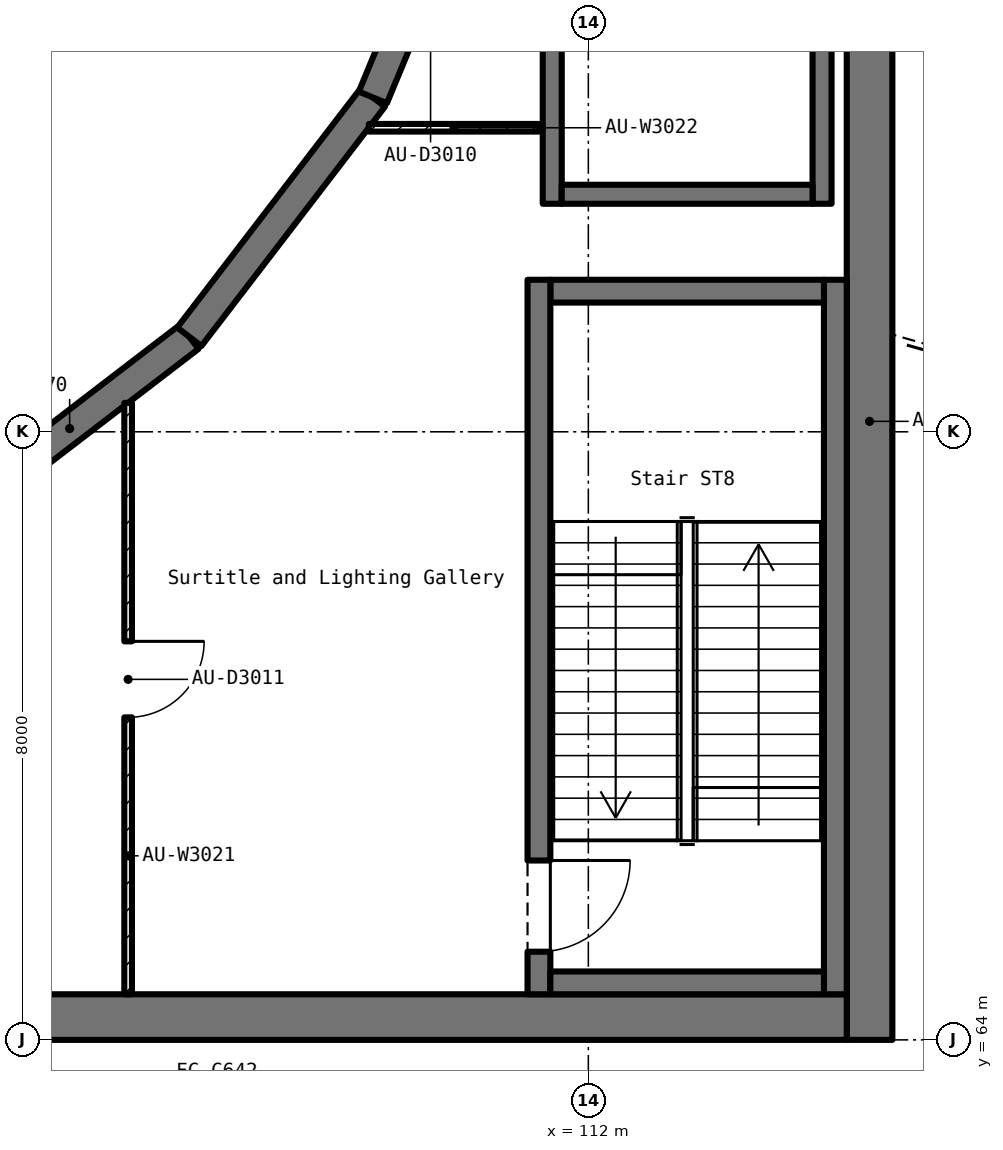
"""IFC4 building model, lengths in metres.
Left out: names, types, materials, properties, quantities, classifications, styles, units other than length and angle.
Written with IfcOpenShell. Run it as: python <this file> out.ifc"""

import sys

from ifc_helpers import new_model, si_unit, direction, frame, frame_2d, origin, place, context, subcontext, project, spatial, rectangle, extrude, element, fill, save


model = new_model("IFC4")
c1 = context("Model", 3, precision=1e-05, world=origin(), true_north=direction((0.0, 1.0)))
c2 = subcontext(c1, "Body", "Model", "MODEL_VIEW")
j1 = project(units=[si_unit("LENGTHUNIT", "METRE"), si_unit("PLANEANGLEUNIT", "RADIAN")], contexts=[c1])
p1 = place(None, origin())
s1 = spatial("IfcSite", under=j1, at=p1, CompositionType="ELEMENT")
p2 = place(p1, origin())
s2 = spatial("IfcBuilding", under=s1, at=p2, CompositionType="ELEMENT")
p3 = place(p2, frame((0.0, 0.0, 11.5)))
s3 = spatial("IfcBuildingStorey", under=s2, at=p3, CompositionType="ELEMENT", Elevation=11.5)
p4 = place(p3, frame((115.7, 64.0, 0.0), z_axis=(0.0, 0.0, 1.0), x_axis=(0.0, 1.0, 0.0)))
e1 = element("IfcWall", 1, at=p4, inside=s3, PredefinedType="SHEAR", context=c2, shape_type="SweptSolid", body=[
    extrude(rectangle(XDim=32.0, YDim=0.6, at=frame_2d((16.0, 0.0))), origin(), (0.0, 0.0, 1.0), 5.5),
])
p5 = place(p4, frame((16.275, 0.0, 1.0)))
e2 = element("IfcOpeningElement", 2, at=p5, cuts=e1, PredefinedType="OPENING", context=c2, shape_type="SweptSolid", body=[
    extrude(rectangle(XDim=0.45, YDim=3.6, at=frame_2d((0.225, 1.8))), frame((0.0, 0.312, 0.0), z_axis=(0.0, -1.0, 0.0), x_axis=(1.0, 0.0, 0.0)), (0.0, 0.0, 1.0), 0.624),
])
p6 = place(p4, frame((19.275, 0.0, 1.0)))
e3 = element("IfcOpeningElement", 3, at=p6, cuts=e1, PredefinedType="OPENING", context=c2, shape_type="SweptSolid", body=[
    extrude(rectangle(XDim=0.45, YDim=3.6, at=frame_2d((0.225, 1.8))), frame((0.0, 0.312, 0.0), z_axis=(0.0, -1.0, 0.0), x_axis=(1.0, 0.0, 0.0)), (0.0, 0.0, 1.0), 0.624),
])
p7 = place(p3, frame((76.6, 64.3, 0.0), z_axis=(0.0, 0.0, 1.0), x_axis=(1.0, 0.0, 0.0)))
e4 = element("IfcWall", 4, at=p7, inside=s3, PredefinedType="SHEAR", context=c2, shape_type="SweptSolid", body=[
    extrude(rectangle(XDim=38.8, YDim=0.6, at=frame_2d((19.4, 0.0))), origin(), (0.0, 0.0, 1.0), 5.5),
])
for number, where, z_axis, x_axis in (
    (5, (103.601, 70.835, 0.0), (0.0, 0.0, 1.0), (0.794, 0.609, 0.0)),
    (6, (106.75, 73.25, 0.0), (0.0, 0.0, 1.0), (0.609, 0.794, 0.0)),
):
    element("IfcWall", number, at=place(p3, frame(where, z_axis=z_axis, x_axis=x_axis)), inside=s3, PredefinedType="SHEAR", context=c2, shape_type="SweptSolid", body=[
        extrude(rectangle(XDim=3.969, YDim=0.4, at=frame_2d((1.984, 0.0))), origin(), (0.0, 0.0, 1.0), 5.5),
    ])
p8 = place(p3, frame((109.165, 76.399, 0.0), z_axis=(0.0, 0.0, 1.0), x_axis=(0.38271032831, 0.923868391388, 0.0)))
e7 = element("IfcWall", 7, at=p8, inside=s3, PredefinedType="SHEAR", context=c2, shape_type="SweptSolid", body=[
    extrude(rectangle(XDim=3.969, YDim=0.4, at=frame_2d((1.985, 0.0))), origin(), (0.0, 0.0, 1.0), 5.5),
])
p9 = place(p8, frame((1.084, 0.0, 0.0)))
e8 = element("IfcOpeningElement", 8, at=p9, cuts=e7, PredefinedType="OPENING", context=c2, shape_type="SweptSolid", body=[
    extrude(rectangle(XDim=1.8, YDim=2.1, at=frame_2d((0.9, 1.05))), frame((0.0, 0.212, 0.0), z_axis=(0.0, -1.0, 0.0), x_axis=(1.0, 0.0, 0.0)), (0.0, 0.0, 1.0), 0.424),
])
p10 = place(p3, frame((115.25, 64.6, 0.0), z_axis=(0.0, 0.0, 1.0), x_axis=(0.0, 1.0, 0.0)))
e9 = element("IfcWall", 9, at=p10, inside=s3, PredefinedType="SOLIDWALL", context=c2, shape_type="SweptSolid", body=[
    extrude(rectangle(XDim=9.4, YDim=0.3, at=frame_2d((4.7, 0.0))), origin(), (0.0, 0.0, 1.0), 5.5),
])
p11 = place(p3, frame((115.1, 73.85, 0.0), z_axis=(0.0, 0.0, 1.0), x_axis=(-1.0, 0.0, 0.0)))
e10 = element("IfcWall", 10, at=p11, inside=s3, PredefinedType="SOLIDWALL", context=c2, shape_type="SweptSolid", body=[
    extrude(rectangle(XDim=3.6, YDim=0.3, at=frame_2d((1.8, 0.0))), origin(), (0.0, 0.0, 1.0), 5.5),
])
p12 = place(p3, frame((111.35, 74.0, 0.0), z_axis=(0.0, 0.0, 1.0), x_axis=(0.0, -1.0, 0.0)))
e11 = element("IfcWall", 11, at=p12, inside=s3, PredefinedType="SOLIDWALL", context=c2, shape_type="SweptSolid", body=[
    extrude(rectangle(XDim=9.4, YDim=0.3, at=frame_2d((4.7, 0.0))), origin(), (0.0, 0.0, 1.0), 5.5),
])
p13 = place(p12, frame((7.64, 0.0, 0.0)))
e12 = element("IfcOpeningElement", 12, at=p13, cuts=e11, PredefinedType="OPENING", context=c2, shape_type="SweptSolid", body=[
    extrude(rectangle(XDim=1.2, YDim=2.1, at=frame_2d((0.6, 1.05))), frame((0.0, 0.162, 0.0), z_axis=(0.0, -1.0, 0.0), x_axis=(1.0, 0.0, 0.0)), (0.0, 0.0, 1.0), 0.324),
])
p14 = place(p3, frame((111.5, 64.75, 0.0), z_axis=(0.0, 0.0, 1.0), x_axis=(1.0, 0.0, 0.0)))
e13 = element("IfcWall", 13, at=p14, inside=s3, PredefinedType="SOLIDWALL", context=c2, shape_type="SweptSolid", body=[
    extrude(rectangle(XDim=3.6, YDim=0.3, at=frame_2d((1.8, 0.0))), origin(), (0.0, 0.0, 1.0), 5.5),
])
for number, where, z_axis, x_axis in (
    (14, (115.075, 75.0, 0.0), (0.0, 0.0, 1.0), (0.0, 1.0, 0.0)),
    (15, (111.525, 79.0, 0.0), (0.0, 0.0, 1.0), (0.0, -1.0, 0.0)),
):
    element("IfcWall", number, at=place(p3, frame(where, z_axis=z_axis, x_axis=x_axis)), inside=s3, PredefinedType="SOLIDWALL", context=c2, shape_type="SweptSolid", body=[
        extrude(rectangle(XDim=4.0, YDim=0.25, at=frame_2d((2.0, 0.0))), origin(), (0.0, 0.0, 1.0), 5.5),
    ])
p15 = place(p3, frame((111.65, 75.125, 0.0), z_axis=(0.0, 0.0, 1.0), x_axis=(1.0, 0.0, 0.0)))
e16 = element("IfcWall", 16, at=p15, inside=s3, PredefinedType="SOLIDWALL", context=c2, shape_type="SweptSolid", body=[
    extrude(rectangle(XDim=3.3, YDim=0.25, at=frame_2d((1.65, 0.0))), origin(), (0.0, 0.0, 1.0), 5.5),
])
p16 = place(p3, frame((105.945, 72.38, 0.0), z_axis=(0.0, 0.0, 1.0), x_axis=(0.0, -1.0, 0.0)))
e17 = element("IfcWall", 17, at=p16, inside=s3, PredefinedType="PARTITIONING", context=c2, shape_type="SweptSolid", body=[
    extrude(rectangle(XDim=7.78, YDim=0.1, at=frame_2d((3.89, 0.0))), origin(), (0.0, 0.0, 1.0), 4.3),
])
p17 = place(p16, frame((3.137, 0.0, 0.0)))
e18 = element("IfcOpeningElement", 18, at=p17, cuts=e17, PredefinedType="OPENING", context=c2, shape_type="SweptSolid", body=[
    extrude(rectangle(XDim=1.0, YDim=2.1, at=frame_2d((0.5, 1.05))), frame((0.0, 0.062, 0.0), z_axis=(0.0, -1.0, 0.0), x_axis=(1.0, 0.0, 0.0)), (0.0, 0.0, 1.0), 0.124),
])
p18 = place(p3, frame((111.35, 76.0, 0.0), z_axis=(0.0, 0.0, 1.0), x_axis=(-1.0, 0.0, 0.0)))
e19 = element("IfcWall", 19, at=p18, inside=s3, PredefinedType="PARTITIONING", context=c2, shape_type="SweptSolid", body=[
    extrude(rectangle(XDim=2.238, YDim=0.1, at=frame_2d((1.119, 0.0))), origin(), (0.0, 0.0, 1.0), 4.3),
])
p19 = place(p13, origin())
e20 = element("IfcDoor", 20, at=p19, inside=s3, OperationType="SINGLE_SWING_LEFT", PredefinedType="DOOR", context=c2, shape_type="SweptSolid", body=[
    extrude(rectangle(XDim=1.2, YDim=2.1, at=frame_2d((0.6, 1.05))), frame((0.0, 0.025, 0.0), z_axis=(0.0, -1.0, 0.0), x_axis=(1.0, 0.0, 0.0)), (0.0, 0.0, 1.0), 0.05),
])
fill(e12, e20)
p20 = place(p17, origin())
e21 = element("IfcDoor", 21, at=p20, inside=s3, OperationType="SINGLE_SWING_LEFT", PredefinedType="DOOR", context=c2, shape_type="SweptSolid", body=[
    extrude(rectangle(XDim=1.0, YDim=2.1, at=frame_2d((0.5, 1.05))), frame((0.0, 0.025, 0.0), z_axis=(0.0, -1.0, 0.0), x_axis=(1.0, 0.0, 0.0)), (0.0, 0.0, 1.0), 0.05),
])
fill(e18, e21)
save(model, sys.argv[1])
